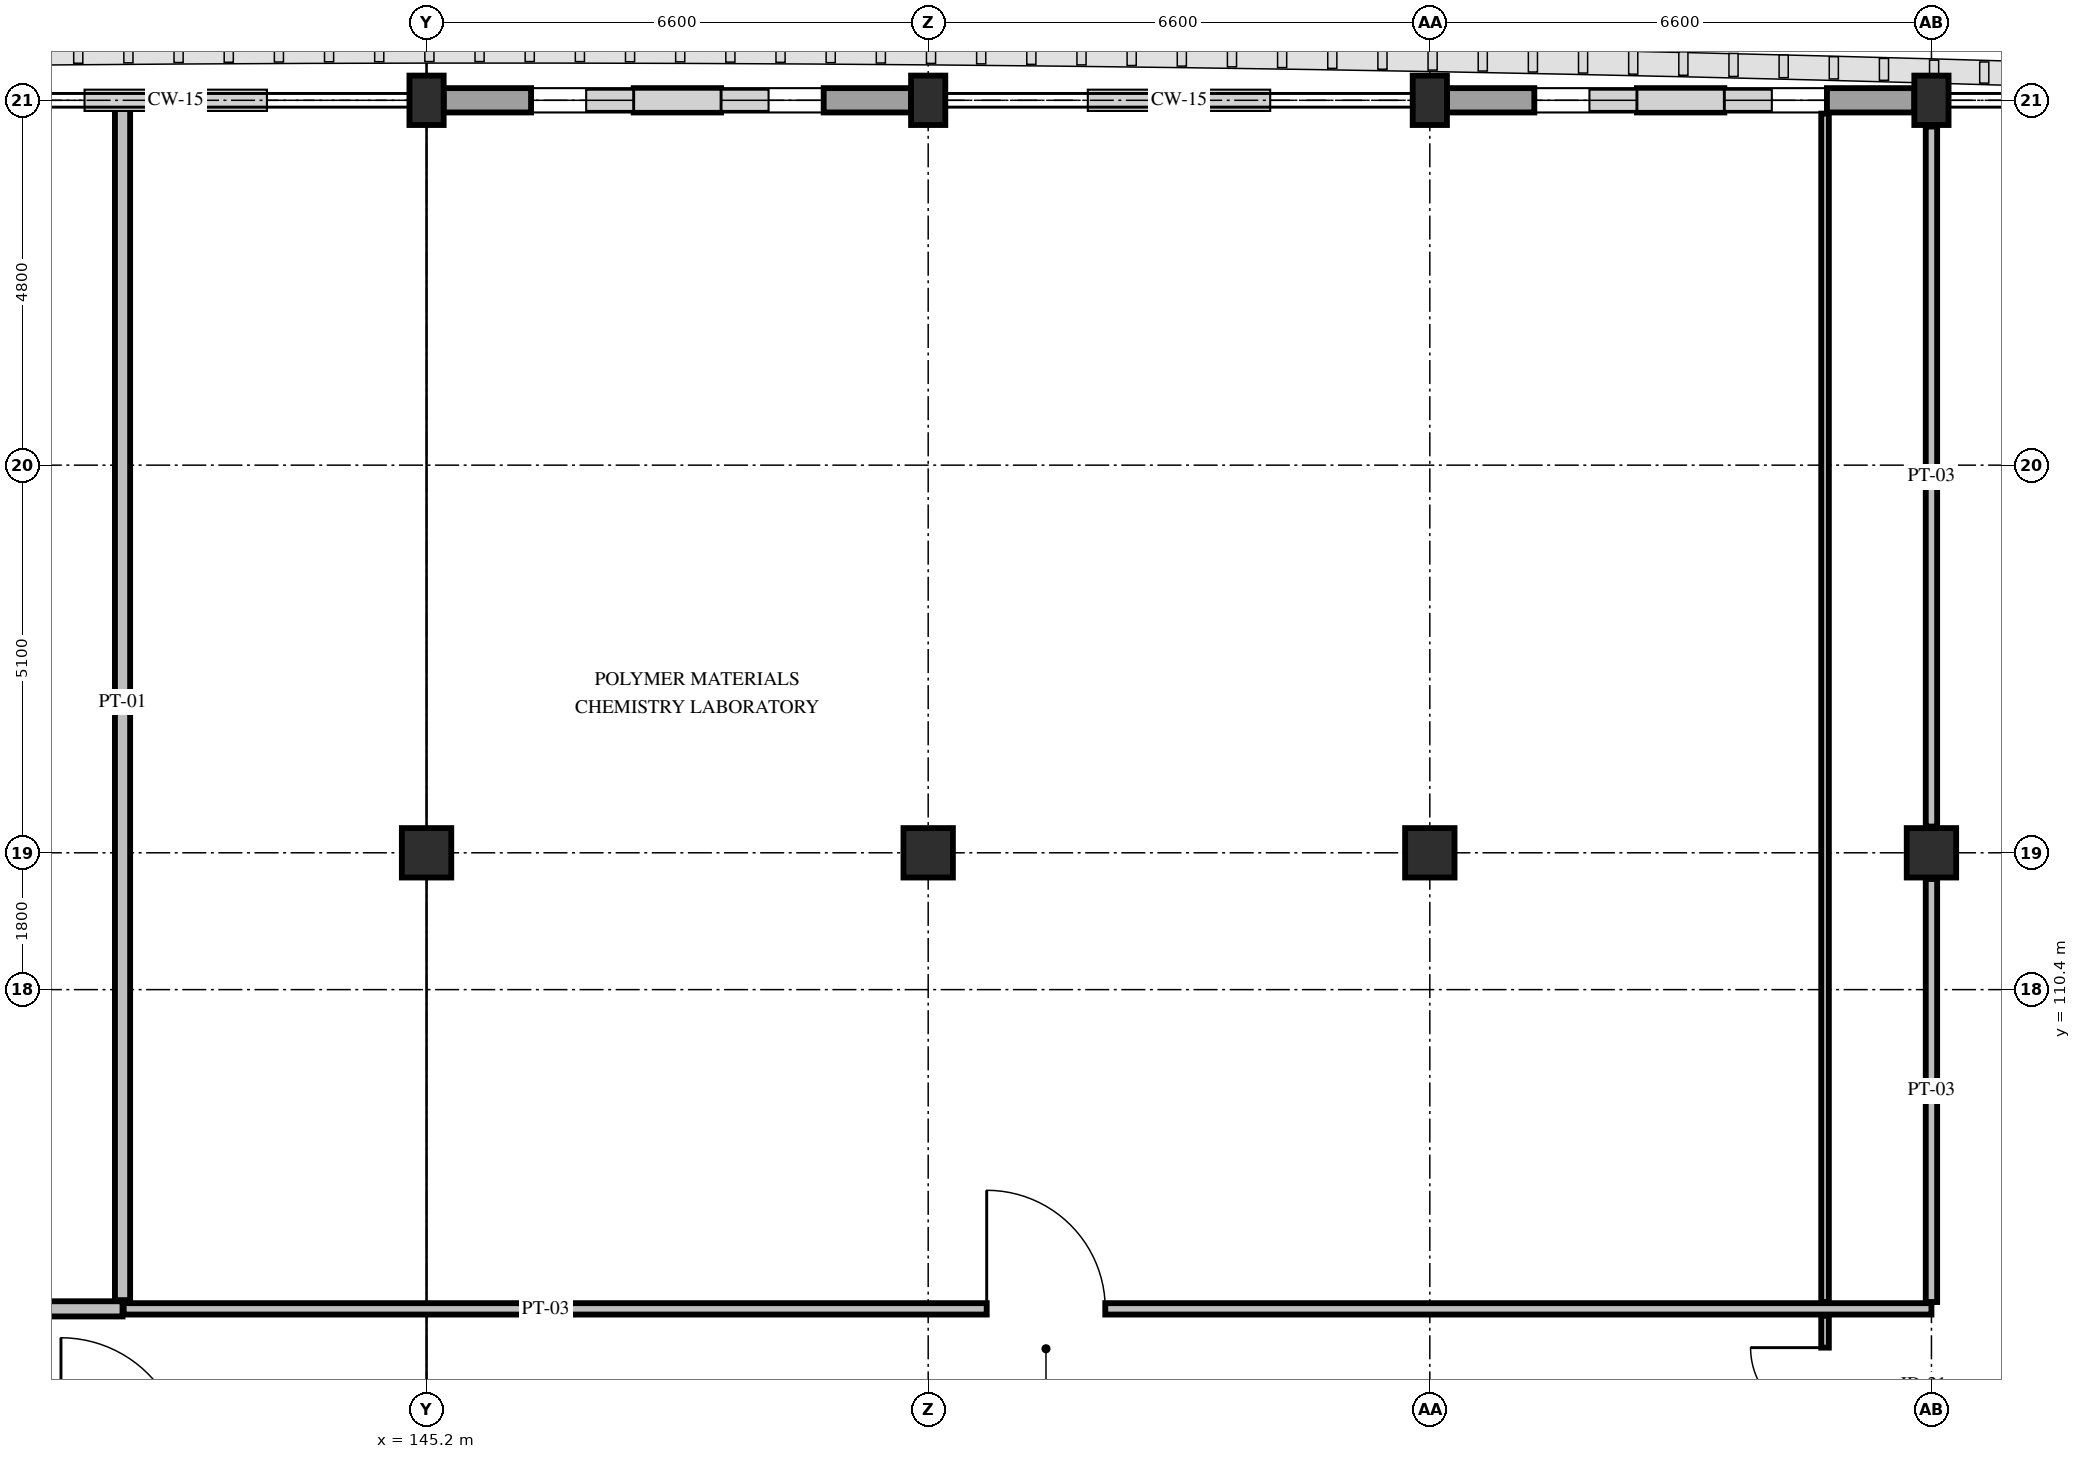
"""IFC4 building model, lengths in metres.
Left out: names, types, materials, properties, quantities, classifications, styles, units other than length and angle.
Written with IfcOpenShell. Run it as: python <this file> out.ifc"""

import sys

from ifc_helpers import new_model, si_unit, direction, frame, frame_2d, origin, origin_2d, place, context, subcontext, project, spatial, rectangle, extrude, element, fill, save


model = new_model("IFC4")
c1 = context("Model", 3, precision=1e-05, world=origin(), true_north=direction((0.0, 1.0)))
c2 = subcontext(c1, "Body", "Model", "MODEL_VIEW")
j1 = project(units=[si_unit("LENGTHUNIT", "METRE"), si_unit("PLANEANGLEUNIT", "RADIAN")], contexts=[c1])
p1 = place(None, origin())
s1 = spatial("IfcSite", under=j1, at=p1, CompositionType="ELEMENT")
p2 = place(p1, origin())
s2 = spatial("IfcBuilding", under=s1, at=p2, CompositionType="ELEMENT")
p3 = place(p2, frame((0.0, 0.0, 29.4)))
s3 = spatial("IfcBuildingStorey", under=s2, at=p3, CompositionType="ELEMENT", Elevation=29.4)
p4 = place(p3, frame((145.2, 112.2, 0.0), z_axis=(0.0, 0.0, 1.0), x_axis=(1.0, 0.0, 0.0)))
e1 = element("IfcColumn", 1, at=p4, inside=s3, PredefinedType="COLUMN", context=c2, shape_type="SweptSolid", body=[
    extrude(rectangle(XDim=0.65, YDim=0.65, at=origin_2d()), origin(), (0.0, 0.0, 1.0), 4.8),
])
p5 = place(p3, frame((145.2, 122.1, 0.0), z_axis=(0.0, 0.0, 1.0), x_axis=(1.0, 0.0, 0.0)))
e2 = element("IfcColumn", 2, at=p5, inside=s3, PredefinedType="PILASTER", context=c2, shape_type="SweptSolid", body=[
    extrude(rectangle(XDim=0.45, YDim=0.65, at=origin_2d()), origin(), (0.0, 0.0, 1.0), 4.8),
])
p6 = place(p3, frame((151.8, 112.2, 0.0), z_axis=(0.0, 0.0, 1.0), x_axis=(1.0, 0.0, 0.0)))
e3 = element("IfcColumn", 3, at=p6, inside=s3, PredefinedType="COLUMN", context=c2, shape_type="SweptSolid", body=[
    extrude(rectangle(XDim=0.65, YDim=0.65, at=origin_2d()), origin(), (0.0, 0.0, 1.0), 4.8),
])
p7 = place(p3, frame((151.8, 122.1, 0.0), z_axis=(0.0, 0.0, 1.0), x_axis=(1.0, 0.0, 0.0)))
e4 = element("IfcColumn", 4, at=p7, inside=s3, PredefinedType="PILASTER", context=c2, shape_type="SweptSolid", body=[
    extrude(rectangle(XDim=0.45, YDim=0.65, at=origin_2d()), origin(), (0.0, 0.0, 1.0), 4.8),
])
p8 = place(p3, frame((158.4, 112.2, 0.0), z_axis=(0.0, 0.0, 1.0), x_axis=(1.0, 0.0, 0.0)))
e5 = element("IfcColumn", 5, at=p8, inside=s3, PredefinedType="COLUMN", context=c2, shape_type="SweptSolid", body=[
    extrude(rectangle(XDim=0.65, YDim=0.65, at=origin_2d()), origin(), (0.0, 0.0, 1.0), 4.8),
])
p9 = place(p3, frame((158.4, 122.1, 0.0), z_axis=(0.0, 0.0, 1.0), x_axis=(1.0, 0.0, 0.0)))
e6 = element("IfcColumn", 6, at=p9, inside=s3, PredefinedType="PILASTER", context=c2, shape_type="SweptSolid", body=[
    extrude(rectangle(XDim=0.45, YDim=0.65, at=origin_2d()), origin(), (0.0, 0.0, 1.0), 4.8),
])
p10 = place(p3, frame((165.0, 112.2, 0.0), z_axis=(0.0, 0.0, 1.0), x_axis=(1.0, 0.0, 0.0)))
e7 = element("IfcColumn", 7, at=p10, inside=s3, PredefinedType="COLUMN", context=c2, shape_type="SweptSolid", body=[
    extrude(rectangle(XDim=0.65, YDim=0.65, at=origin_2d()), origin(), (0.0, 0.0, 1.0), 4.8),
])
p11 = place(p3, frame((165.0, 122.1, 0.0), z_axis=(0.0, 0.0, 1.0), x_axis=(1.0, 0.0, 0.0)))
e8 = element("IfcColumn", 8, at=p11, inside=s3, PredefinedType="PILASTER", context=c2, shape_type="SweptSolid", body=[
    extrude(rectangle(XDim=0.45, YDim=0.65, at=origin_2d()), origin(), (0.0, 0.0, 1.0), 4.8),
])
p12 = place(p3, frame((145.425, 122.1, 0.0), z_axis=(0.0, 0.0, 1.0), x_axis=(1.0, 0.0, 0.0)))
e9 = element("IfcWall", 9, at=p12, inside=s3, PredefinedType="STANDARD", context=c2, shape_type="SweptSolid", body=[
    extrude(rectangle(XDim=6.15, YDim=0.32, at=frame_2d((3.075, 0.0))), origin(), (0.0, 0.0, 1.0), 3.78),
])
p13 = place(p12, frame((1.15, 0.0, 0.85)))
e10 = element("IfcOpeningElement", 10, at=p13, cuts=e9, PredefinedType="OPENING", context=c2, shape_type="SweptSolid", body=[
    extrude(rectangle(XDim=1.35, YDim=2.08, at=frame_2d((0.675, 1.04))), frame((0.0, 0.175, 0.0), z_axis=(0.0, -1.0, 0.0), x_axis=(1.0, 0.0, 0.0)), (0.0, 0.0, 1.0), 0.35),
])
p14 = place(p12, frame((3.65, 0.0, 0.85)))
e11 = element("IfcOpeningElement", 11, at=p14, cuts=e9, PredefinedType="OPENING", context=c2, shape_type="SweptSolid", body=[
    extrude(rectangle(XDim=1.35, YDim=2.08, at=frame_2d((0.675, 1.04))), frame((0.0, 0.175, 0.0), z_axis=(0.0, -1.0, 0.0), x_axis=(1.0, 0.0, 0.0)), (0.0, 0.0, 1.0), 0.35),
])
p15 = place(p3, frame((158.625, 122.1, 0.0), z_axis=(0.0, 0.0, 1.0), x_axis=(1.0, 0.0, 0.0)))
e12 = element("IfcWall", 12, at=p15, inside=s3, PredefinedType="STANDARD", context=c2, shape_type="SweptSolid", body=[
    extrude(rectangle(XDim=6.15, YDim=0.32, at=frame_2d((3.075, 0.0))), origin(), (0.0, 0.0, 1.0), 3.78),
])
p16 = place(p15, frame((1.15, 0.0, 0.85)))
e13 = element("IfcOpeningElement", 13, at=p16, cuts=e12, PredefinedType="OPENING", context=c2, shape_type="SweptSolid", body=[
    extrude(rectangle(XDim=1.35, YDim=2.08, at=frame_2d((0.675, 1.04))), frame((0.0, 0.175, 0.0), z_axis=(0.0, -1.0, 0.0), x_axis=(1.0, 0.0, 0.0)), (0.0, 0.0, 1.0), 0.35),
])
p17 = place(p15, frame((3.65, 0.0, 0.85)))
e14 = element("IfcOpeningElement", 14, at=p17, cuts=e12, PredefinedType="OPENING", context=c2, shape_type="SweptSolid", body=[
    extrude(rectangle(XDim=1.35, YDim=2.08, at=frame_2d((0.675, 1.04))), frame((0.0, 0.175, 0.0), z_axis=(0.0, -1.0, 0.0), x_axis=(1.0, 0.0, 0.0)), (0.0, 0.0, 1.0), 0.35),
])
p18 = place(p3, frame((119.04, 106.2, 0.0), z_axis=(0.0, 0.0, 1.0), x_axis=(1.0, 0.0, 0.0)))
e15 = element("IfcWall", 15, at=p18, inside=s3, PredefinedType="PARTITIONING", context=c2, shape_type="SweptSolid", body=[
    extrude(rectangle(XDim=22.16, YDim=0.2, at=frame_2d((11.08, 0.0))), origin(), (0.0, 0.0, 1.0), 3.78),
])
p19 = place(p18, frame((10.22, 0.0, 0.0)))
e16 = element("IfcOpeningElement", 16, at=p19, cuts=e15, PredefinedType="OPENING", context=c2, shape_type="SweptSolid", body=[
    extrude(rectangle(XDim=1.76, YDim=2.35, at=frame_2d((0.88, 1.175))), frame((0.0, 0.115, 0.0), z_axis=(0.0, -1.0, 0.0), x_axis=(1.0, 0.0, 0.0)), (0.0, 0.0, 1.0), 0.23),
])
p20 = place(p3, frame((141.2, 106.315, 0.0), z_axis=(0.0, 0.0, 1.0), x_axis=(0.0, 1.0, 0.0)))
e17 = element("IfcWall", 17, at=p20, inside=s3, PredefinedType="PARTITIONING", context=c2, shape_type="SweptSolid", body=[
    extrude(rectangle(XDim=15.745, YDim=0.2, at=frame_2d((7.873, 0.0))), origin(), (0.0, 0.0, 1.0), 3.93),
])
p21 = place(p3, frame((141.215, 106.2, 0.0), z_axis=(0.0, 0.0, 1.0), x_axis=(1.0, 0.0, 0.0)))
e18 = element("IfcWall", 18, at=p21, inside=s3, PredefinedType="PARTITIONING", context=c2, shape_type="SweptSolid", body=[
    extrude(rectangle(XDim=23.785, YDim=0.15, at=frame_2d((11.893, 0.0))), origin(), (0.0, 0.0, 1.0), 3.78),
])
p22 = place(p21, frame((11.355, 0.0, 0.0)))
e19 = element("IfcOpeningElement", 19, at=p22, cuts=e18, PredefinedType="OPENING", context=c2, shape_type="SweptSolid", body=[
    extrude(rectangle(XDim=1.56, YDim=2.3, at=frame_2d((0.78, 1.15))), frame((0.0, 0.09, 0.0), z_axis=(0.0, -1.0, 0.0), x_axis=(1.0, 0.0, 0.0)), (0.0, 0.0, 1.0), 0.18),
])
p23 = place(p3, frame((165.0, 106.29, 0.0), z_axis=(0.0, 0.0, 1.0), x_axis=(0.0, 1.0, 0.0)))
e20 = element("IfcWall", 20, at=p23, inside=s3, PredefinedType="PARTITIONING", context=c2, shape_type="SweptSolid", body=[
    extrude(rectangle(XDim=5.565, YDim=0.15, at=frame_2d((2.782, 0.0))), origin(), (0.0, 0.0, 1.0), 3.78),
])
p24 = place(p3, frame((165.0, 112.545, 0.0), z_axis=(0.0, 0.0, 1.0), x_axis=(0.0, 1.0, 0.0)))
e21 = element("IfcWall", 21, at=p24, inside=s3, PredefinedType="PARTITIONING", context=c2, shape_type="SweptSolid", body=[
    extrude(rectangle(XDim=9.21, YDim=0.15, at=frame_2d((4.605, 0.0))), origin(), (0.0, 0.0, 1.0), 3.78),
])
p25 = place(p3, frame((163.6, 102.3, 0.0), z_axis=(0.0, 0.0, 1.0), x_axis=(0.0, 1.0, 0.0)))
e22 = element("IfcWall", 22, at=p25, inside=s3, PredefinedType="PARTITIONING", context=c2, shape_type="SweptSolid", body=[
    extrude(rectangle(XDim=3.81, YDim=0.1, at=frame_2d((1.905, 0.0))), origin(), (0.0, 0.0, 1.0), 4.065),
])
p26 = place(p25, frame((2.41, 0.0, 0.0)))
e23 = element("IfcOpeningElement", 23, at=p26, cuts=e22, PredefinedType="OPENING", context=c2, shape_type="SweptSolid", body=[
    extrude(rectangle(XDim=0.98, YDim=2.2, at=frame_2d((0.49, 1.1))), frame((0.0, 0.065, 0.0), z_axis=(0.0, -1.0, 0.0), x_axis=(1.0, 0.0, 0.0)), (0.0, 0.0, 1.0), 0.13),
])
p27 = place(p3, frame((163.6, 106.29, 0.0), z_axis=(0.0, 0.0, 1.0), x_axis=(0.0, 1.0, 0.0)))
e24 = element("IfcWall", 24, at=p27, inside=s3, PredefinedType="PARTITIONING", context=c2, shape_type="SweptSolid", body=[
    extrude(rectangle(XDim=15.635, YDim=0.1, at=frame_2d((7.817, 0.0))), origin(), (0.0, 0.0, 1.0), 3.93),
])
p28 = place(p13, origin())
e25 = element("IfcWindow", 25, at=p28, inside=s3, PartitioningType="SINGLE_PANEL", PredefinedType="WINDOW", context=c2, shape_type="SweptSolid", body=[
    extrude(rectangle(XDim=1.35, YDim=2.08, at=frame_2d((0.675, 1.04))), frame((0.0, 0.03, 0.0), z_axis=(0.0, -1.0, 0.0), x_axis=(1.0, 0.0, 0.0)), (0.0, 0.0, 1.0), 0.06),
])
fill(e10, e25)
p29 = place(p14, origin())
e26 = element("IfcWindow", 26, at=p29, inside=s3, PartitioningType="SINGLE_PANEL", PredefinedType="WINDOW", context=c2, shape_type="SweptSolid", body=[
    extrude(rectangle(XDim=1.35, YDim=2.08, at=frame_2d((0.675, 1.04))), frame((0.0, 0.03, 0.0), z_axis=(0.0, -1.0, 0.0), x_axis=(1.0, 0.0, 0.0)), (0.0, 0.0, 1.0), 0.06),
])
fill(e11, e26)
p30 = place(p16, origin())
e27 = element("IfcWindow", 27, at=p30, inside=s3, PartitioningType="SINGLE_PANEL", PredefinedType="WINDOW", context=c2, shape_type="SweptSolid", body=[
    extrude(rectangle(XDim=1.35, YDim=2.08, at=frame_2d((0.675, 1.04))), frame((0.0, 0.03, 0.0), z_axis=(0.0, -1.0, 0.0), x_axis=(1.0, 0.0, 0.0)), (0.0, 0.0, 1.0), 0.06),
])
fill(e13, e27)
p31 = place(p17, origin())
e28 = element("IfcWindow", 28, at=p31, inside=s3, PartitioningType="SINGLE_PANEL", PredefinedType="WINDOW", context=c2, shape_type="SweptSolid", body=[
    extrude(rectangle(XDim=1.35, YDim=2.08, at=frame_2d((0.675, 1.04))), frame((0.0, 0.03, 0.0), z_axis=(0.0, -1.0, 0.0), x_axis=(1.0, 0.0, 0.0)), (0.0, 0.0, 1.0), 0.06),
])
fill(e14, e28)
p32 = place(p22, origin())
e29 = element("IfcDoor", 29, at=p32, inside=s3, OperationType="SINGLE_SWING_LEFT", PredefinedType="DOOR", context=c2, shape_type="SweptSolid", body=[
    extrude(rectangle(XDim=1.56, YDim=2.3, at=frame_2d((0.78, 1.15))), frame((0.0, 0.025, 0.0), z_axis=(0.0, -1.0, 0.0), x_axis=(1.0, 0.0, 0.0)), (0.0, 0.0, 1.0), 0.05),
])
fill(e19, e29)
p33 = place(p26, origin())
e30 = element("IfcDoor", 30, at=p33, inside=s3, OperationType="SINGLE_SWING_RIGHT", PredefinedType="DOOR", context=c2, shape_type="SweptSolid", body=[
    extrude(rectangle(XDim=0.98, YDim=2.2, at=frame_2d((0.49, 1.1))), frame((0.0, 0.025, 0.0), z_axis=(0.0, -1.0, 0.0), x_axis=(1.0, 0.0, 0.0)), (0.0, 0.0, 1.0), 0.05),
])
fill(e23, e30)
save(model, sys.argv[1])
